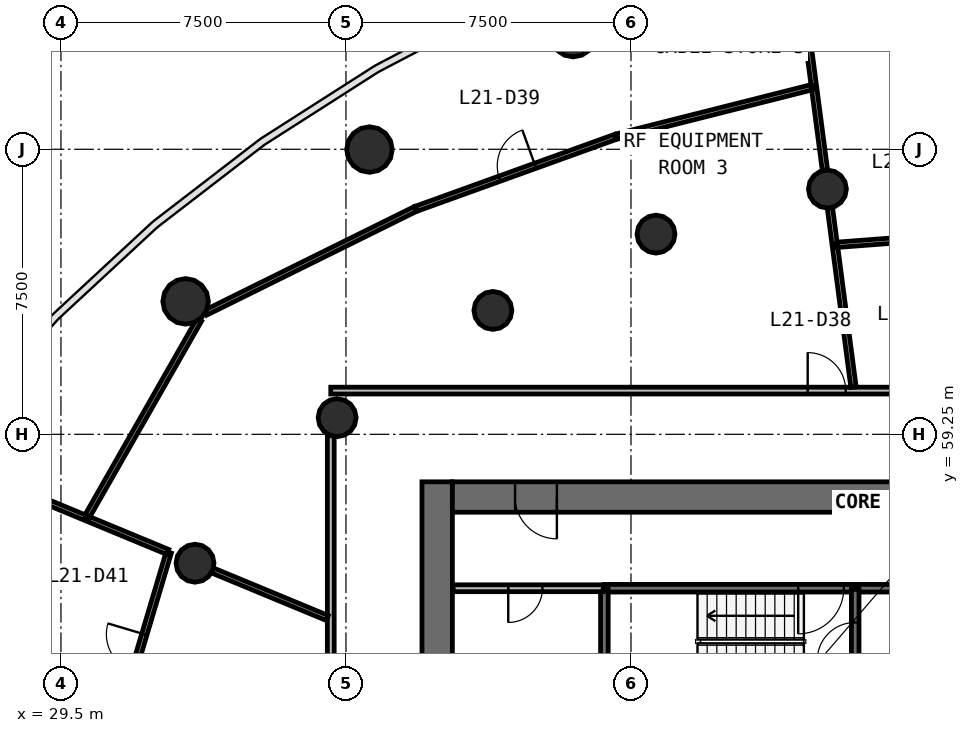
"""IFC4 building model, lengths in metres.
Left out: names, types, materials, properties, quantities, classifications, styles, units other than length and angle.
Written with IfcOpenShell. Run it as: python <this file> out.ifc"""

import sys

from ifc_helpers import new_model, si_unit, direction, frame, frame_2d, origin, origin_2d, place, context, subcontext, project, spatial, rectangle, circle, extrude, source, transform, mapped, element, fill, save


model = new_model("IFC4")
c1 = context("Model", 3, precision=1e-05, world=origin(), true_north=direction((0.0, 1.0)))
c2 = subcontext(c1, "Body", "Model", "MODEL_VIEW")
j1 = project(units=[si_unit("LENGTHUNIT", "METRE"), si_unit("PLANEANGLEUNIT", "RADIAN")], contexts=[c1])
p1 = place(None, origin())
s1 = spatial("IfcSite", under=j1, at=p1, CompositionType="ELEMENT")
p2 = place(p1, origin())
s2 = spatial("IfcBuilding", under=s1, at=p2, CompositionType="ELEMENT")
p3 = place(p2, frame((0.0, 0.0, 92.1)))
s3 = spatial("IfcBuildingStorey", under=s2, at=p3, CompositionType="ELEMENT", Elevation=92.1)
p4 = place(p3, frame((39.4, 58.0, 0.0), z_axis=(0.0, 0.0, 1.0), x_axis=(0.0, -1.0, 0.0)))
e1 = element("IfcWall", 1, at=p4, inside=s3, PredefinedType="SHEAR", context=c2, shape_type="SweptSolid", body=[
    extrude(rectangle(XDim=20.0, YDim=0.8, at=frame_2d((10.0, 0.0))), origin(), (0.0, 0.0, 1.0), 4.1),
])
p5 = place(p4, frame((9.1, 0.0, 0.0)))
e2 = element("IfcOpeningElement", 2, at=p5, cuts=e1, PredefinedType="OPENING", context=c2, shape_type="SweptSolid", body=[
    extrude(rectangle(XDim=1.8, YDim=2.1, at=frame_2d((0.9, 1.05))), frame((0.0, 0.41, 0.0), z_axis=(0.0, -1.0, 0.0), x_axis=(1.0, 0.0, 0.0)), (0.0, 0.0, 1.0), 0.82),
])
p6 = place(p3, frame((64.2, 57.6, 0.0), z_axis=(0.0, 0.0, 1.0), x_axis=(-1.0, 0.0, 0.0)))
e3 = element("IfcWall", 3, at=p6, inside=s3, PredefinedType="SHEAR", context=c2, shape_type="SweptSolid", body=[
    extrude(rectangle(XDim=24.4, YDim=0.8, at=frame_2d((12.2, 0.0))), origin(), (0.0, 0.0, 1.0), 4.1),
])
p7 = place(p6, frame((21.65, 0.0, 0.0)))
e4 = element("IfcOpeningElement", 4, at=p7, cuts=e3, PredefinedType="OPENING", context=c2, shape_type="SweptSolid", body=[
    extrude(rectangle(XDim=1.1, YDim=2.1, at=frame_2d((0.55, 1.05))), frame((0.0, 0.41, 0.0), z_axis=(0.0, -1.0, 0.0), x_axis=(1.0, 0.0, 0.0)), (0.0, 0.0, 1.0), 0.82),
])
p8 = place(p6, frame((2.15, 0.0, 0.0)))
e5 = element("IfcOpeningElement", 5, at=p8, cuts=e3, PredefinedType="OPENING", context=c2, shape_type="SweptSolid", body=[
    extrude(rectangle(XDim=1.1, YDim=2.1, at=frame_2d((0.55, 1.05))), frame((0.0, 0.41, 0.0), z_axis=(0.0, -1.0, 0.0), x_axis=(1.0, 0.0, 0.0)), (0.0, 0.0, 1.0), 0.82),
])
m1 = source(origin(), c2, "Body", "SweptSolid", [
    extrude(circle(Radius=0.6, at=origin_2d()), origin(), (0.0, 0.0, 1.0), 4.1),
])
for number, where, z_axis, x_axis in (
    (6, (42.978, 69.781, 0.0), (0.0, 0.0, 1.0), (1.0, 0.0, 0.0)),
    (7, (37.618, 66.743, 0.0), (0.0, 0.0, 1.0), (1.0, 0.0, 0.0)),
    (8, (32.78, 62.748, 0.0), (0.0, 0.0, 1.0), (1.0, 0.0, 0.0)),
):
    element("IfcColumn", number, at=place(p3, frame(where, z_axis=z_axis, x_axis=x_axis)), inside=s3, PredefinedType="COLUMN", context=c2, shape_type="MappedRepresentation", body=[
        mapped(m1, transform((0.0, 0.0, 0.0), scale=1.0)),
    ])
m2 = source(origin(), c2, "Body", "SweptSolid", [
    extrude(circle(Radius=0.5, at=origin_2d()), origin(), (0.0, 0.0, 1.0), 4.1),
])
for number, where, z_axis, x_axis in (
    (9, (49.669, 65.703, 0.0), (0.0, 0.0, 1.0), (1.0, 0.0, 0.0)),
    (10, (45.158, 64.518, 0.0), (0.0, 0.0, 1.0), (1.0, 0.0, 0.0)),
    (11, (40.866, 62.51, 0.0), (0.0, 0.0, 1.0), (1.0, 0.0, 0.0)),
    (12, (36.768, 59.688, 0.0), (0.0, 0.0, 1.0), (1.0, 0.0, 0.0)),
    (13, (33.028, 55.859, 0.0), (0.0, 0.0, 1.0), (1.0, 0.0, 0.0)),
):
    element("IfcColumn", number, at=place(p3, frame(where, z_axis=z_axis, x_axis=x_axis)), inside=s3, PredefinedType="COLUMN", context=c2, shape_type="MappedRepresentation", body=[
        mapped(m2, transform((0.0, 0.0, 0.0), scale=1.0)),
    ])
p9 = place(p3, frame((50.4, 55.2, 0.0), z_axis=(0.0, 0.0, 1.0), x_axis=(-1.0, 0.0, 0.0)))
e14 = element("IfcWall", 14, at=p9, inside=s3, PredefinedType="SOLIDWALL", context=c2, shape_type="SweptSolid", body=[
    extrude(rectangle(XDim=6.6, YDim=0.2, at=frame_2d((3.3, 0.0))), origin(), (0.0, 0.0, 1.0), 3.7),
])
p10 = place(p9, frame((0.3, 0.0, 0.0)))
e15 = element("IfcOpeningElement", 15, at=p10, cuts=e14, PredefinedType="OPENING", context=c2, shape_type="SweptSolid", body=[
    extrude(rectangle(XDim=1.2, YDim=2.1, at=frame_2d((0.6, 1.05))), frame((0.0, 0.11, 0.0), z_axis=(0.0, -1.0, 0.0), x_axis=(1.0, 0.0, 0.0)), (0.0, 0.0, 1.0), 0.22),
])
p11 = place(p3, frame((56.1, 55.2, 0.0), z_axis=(0.0, 0.0, 1.0), x_axis=(-1.0, 0.0, 0.0)))
e16 = element("IfcWall", 16, at=p11, inside=s3, PredefinedType="SOLIDWALL", context=c2, shape_type="SweptSolid", body=[
    extrude(rectangle(XDim=5.67, YDim=0.2, at=frame_2d((2.835, 0.0))), origin(), (0.0, 0.0, 1.0), 3.7),
])
p12 = place(p11, frame((2.95, 0.0, 0.0)))
e17 = element("IfcOpeningElement", 17, at=p12, cuts=e16, PredefinedType="OPENING", context=c2, shape_type="SweptSolid", body=[
    extrude(rectangle(XDim=1.1, YDim=2.1, at=frame_2d((0.55, 1.05))), frame((0.0, 0.11, 0.0), z_axis=(0.0, -1.0, 0.0), x_axis=(1.0, 0.0, 0.0)), (0.0, 0.0, 1.0), 0.22),
])
p13 = place(p3, frame((50.4, 52.4, 0.0), z_axis=(0.0, 0.0, 1.0), x_axis=(0.0, 1.0, 0.0)))
e18 = element("IfcWall", 18, at=p13, inside=s3, PredefinedType="SOLIDWALL", context=c2, shape_type="SweptSolid", body=[
    extrude(rectangle(XDim=2.77, YDim=0.2, at=frame_2d((1.385, 0.0))), origin(), (0.0, 0.0, 1.0), 3.7),
])
p14 = place(p13, frame((0.9, 0.0, 0.0)))
e19 = element("IfcOpeningElement", 19, at=p14, cuts=e18, PredefinedType="OPENING", context=c2, shape_type="SweptSolid", body=[
    extrude(rectangle(XDim=1.0, YDim=2.1, at=frame_2d((0.5, 1.05))), frame((0.0, 0.11, 0.0), z_axis=(0.0, -1.0, 0.0), x_axis=(1.0, 0.0, 0.0)), (0.0, 0.0, 1.0), 0.22),
])
p15 = place(p3, frame((43.8, 55.17, 0.0), z_axis=(0.0, 0.0, 1.0), x_axis=(0.0, -1.0, 0.0)))
e20 = element("IfcWall", 20, at=p15, inside=s3, PredefinedType="SOLIDWALL", context=c2, shape_type="SweptSolid", body=[
    extrude(rectangle(XDim=2.14, YDim=0.2, at=frame_2d((1.07, 0.0))), origin(), (0.0, 0.0, 1.0), 3.7),
])
p16 = place(p3, frame((36.6, 60.4, 0.0), z_axis=(0.0, 0.0, 1.0), x_axis=(1.0, 0.0, 0.0)))
e21 = element("IfcWall", 21, at=p16, inside=s3, PredefinedType="PARTITIONING", context=c2, shape_type="SweptSolid", body=[
    extrude(rectangle(XDim=30.8, YDim=0.18, at=frame_2d((15.4, 0.0))), origin(), (0.0, 0.0, 1.0), 2.9),
])
p17 = place(p16, frame((20.95, 0.0, 0.0)))
e22 = element("IfcOpeningElement", 22, at=p17, cuts=e21, PredefinedType="OPENING", context=c2, shape_type="SweptSolid", body=[
    extrude(rectangle(XDim=1.0, YDim=2.1, at=frame_2d((0.5, 1.05))), frame((0.0, 0.1, 0.0), z_axis=(0.0, -1.0, 0.0), x_axis=(1.0, 0.0, 0.0)), (0.0, 0.0, 1.0), 0.2),
])
p18 = place(p16, frame((14.95, 0.0, 0.0)))
e23 = element("IfcOpeningElement", 23, at=p18, cuts=e21, PredefinedType="OPENING", context=c2, shape_type="SweptSolid", body=[
    extrude(rectangle(XDim=1.0, YDim=2.1, at=frame_2d((0.5, 1.05))), frame((0.0, 0.1, 0.0), z_axis=(0.0, -1.0, 0.0), x_axis=(1.0, 0.0, 0.0)), (0.0, 0.0, 1.0), 0.2),
])
p19 = place(p16, frame((12.55, 0.0, 0.0)))
e24 = element("IfcOpeningElement", 24, at=p19, cuts=e21, PredefinedType="OPENING", context=c2, shape_type="SweptSolid", body=[
    extrude(rectangle(XDim=1.0, YDim=2.1, at=frame_2d((0.5, 1.05))), frame((0.0, 0.1, 0.0), z_axis=(0.0, -1.0, 0.0), x_axis=(1.0, 0.0, 0.0)), (0.0, 0.0, 1.0), 0.2),
])
p20 = place(p3, frame((36.6, 35.63, 0.0), z_axis=(0.0, 0.0, 1.0), x_axis=(0.0, 1.0, 0.0)))
e25 = element("IfcWall", 25, at=p20, inside=s3, PredefinedType="PARTITIONING", context=c2, shape_type="SweptSolid", body=[
    extrude(rectangle(XDim=23.583, YDim=0.18, at=frame_2d((11.791, 0.0))), origin(), (0.0, 0.0, 1.0), 2.9),
])
p21 = place(p20, frame((11.333, 0.0, 0.0)))
e26 = element("IfcOpeningElement", 26, at=p21, cuts=e25, PredefinedType="OPENING", context=c2, shape_type="SweptSolid", body=[
    extrude(rectangle(XDim=1.0, YDim=2.1, at=frame_2d((0.5, 1.05))), frame((0.0, 0.1, 0.0), z_axis=(0.0, -1.0, 0.0), x_axis=(1.0, 0.0, 0.0)), (0.0, 0.0, 1.0), 0.2),
])
p22 = place(p20, frame((4.532, 0.0, 0.0)))
e27 = element("IfcOpeningElement", 27, at=p22, cuts=e25, PredefinedType="OPENING", context=c2, shape_type="SweptSolid", body=[
    extrude(rectangle(XDim=1.0, YDim=2.1, at=frame_2d((0.5, 1.05))), frame((0.0, 0.1, 0.0), z_axis=(0.0, -1.0, 0.0), x_axis=(1.0, 0.0, 0.0)), (0.0, 0.0, 1.0), 0.2),
])
p23 = place(p3, frame((43.77, 55.2, 0.0), z_axis=(0.0, 0.0, 1.0), x_axis=(-1.0, 0.0, 0.0)))
e28 = element("IfcWall", 28, at=p23, inside=s3, PredefinedType="PARTITIONING", context=c2, shape_type="SweptSolid", body=[
    extrude(rectangle(XDim=3.95, YDim=0.18, at=frame_2d((1.975, 0.0))), origin(), (0.0, 0.0, 1.0), 3.7),
])
p24 = place(p23, frame((1.6, 0.0, 0.0)))
e29 = element("IfcOpeningElement", 29, at=p24, cuts=e28, PredefinedType="OPENING", context=c2, shape_type="SweptSolid", body=[
    extrude(rectangle(XDim=0.9, YDim=2.1, at=frame_2d((0.45, 1.05))), frame((0.0, 0.1, 0.0), z_axis=(0.0, -1.0, 0.0), x_axis=(1.0, 0.0, 0.0)), (0.0, 0.0, 1.0), 0.2),
])
p25 = place(p3, frame((38.821, 65.175, 0.0), z_axis=(0.0, 0.0, 1.0), x_axis=(-0.896426018312, -0.443193404388, 0.0)))
e30 = element("IfcWall", 30, at=p25, inside=s3, PredefinedType="PARTITIONING", context=c2, shape_type="SweptSolid", body=[
    extrude(rectangle(XDim=6.153, YDim=0.14, at=frame_2d((3.076, 0.0))), origin(), (0.0, 0.0, 1.0), 2.9),
])
p26 = place(p3, frame((33.14, 62.263, 0.0), z_axis=(0.0, 0.0, 1.0), x_axis=(-0.495587358923, -0.868558098043, 0.0)))
e31 = element("IfcWall", 31, at=p26, inside=s3, PredefinedType="PARTITIONING", context=c2, shape_type="SweptSolid", body=[
    extrude(rectangle(XDim=6.007, YDim=0.14, at=frame_2d((3.003, 0.0))), origin(), (0.0, 0.0, 1.0), 2.9),
])
p27 = place(p3, frame((38.849, 65.186, 0.0), z_axis=(0.0, 0.0, 1.0), x_axis=(0.940690895338, 0.339264851447, 0.0)))
e32 = element("IfcWall", 32, at=p27, inside=s3, PredefinedType="PARTITIONING", context=c2, shape_type="SweptSolid", body=[
    extrude(rectangle(XDim=5.579, YDim=0.14, at=frame_2d((2.79, 0.0))), origin(), (0.0, 0.0, 1.0), 2.9),
])
p28 = place(p27, frame((2.329, 0.0, 0.0)))
e33 = element("IfcOpeningElement", 33, at=p28, cuts=e32, PredefinedType="OPENING", context=c2, shape_type="SweptSolid", body=[
    extrude(rectangle(XDim=1.0, YDim=2.1, at=frame_2d((0.5, 1.05))), frame((0.0, 0.08, 0.0), z_axis=(0.0, -1.0, 0.0), x_axis=(1.0, 0.0, 0.0)), (0.0, 0.0, 1.0), 0.16),
])
p29 = place(p3, frame((30.753, 50.827, 0.0), z_axis=(0.0, 0.0, 1.0), x_axis=(0.28557117519, 0.95835750318, 0.0)))
e34 = element("IfcWall", 34, at=p29, inside=s3, PredefinedType="PARTITIONING", context=c2, shape_type="SweptSolid", body=[
    extrude(rectangle(XDim=5.548, YDim=0.14, at=frame_2d((2.774, 0.0))), origin(), (0.0, 0.0, 1.0), 2.9),
])
p30 = place(p29, frame((2.299, 0.0, 0.0)))
e35 = element("IfcOpeningElement", 35, at=p30, cuts=e34, PredefinedType="OPENING", context=c2, shape_type="SweptSolid", body=[
    extrude(rectangle(XDim=1.0, YDim=2.1, at=frame_2d((0.5, 1.05))), frame((0.0, 0.08, 0.0), z_axis=(0.0, -1.0, 0.0), x_axis=(1.0, 0.0, 0.0)), (0.0, 0.0, 1.0), 0.16),
])
p31 = place(p3, frame((49.315, 68.396, 0.0), z_axis=(0.0, 0.0, 1.0), x_axis=(-0.969532921221, -0.244961047249, 0.0)))
e36 = element("IfcWall", 36, at=p31, inside=s3, PredefinedType="PARTITIONING", context=c2, shape_type="SweptSolid", body=[
    extrude(rectangle(XDim=5.351, YDim=0.14, at=frame_2d((2.676, 0.0))), origin(), (0.0, 0.0, 1.0), 2.9),
])
p32 = place(p3, frame((49.863, 64.232, 0.0), z_axis=(0.0, 0.0, 1.0), x_axis=(0.997114299224, 0.075914914758, 0.0)))
e37 = element("IfcWall", 37, at=p32, inside=s3, PredefinedType="PARTITIONING", context=c2, shape_type="SweptSolid", body=[
    extrude(rectangle(XDim=4.3, YDim=0.14, at=frame_2d((2.15, 0.0))), origin(), (0.0, 0.0, 1.0), 2.9),
])
p33 = place(p32, frame((1.65, 0.0, 0.0)))
e38 = element("IfcOpeningElement", 38, at=p33, cuts=e37, PredefinedType="OPENING", context=c2, shape_type="SweptSolid", body=[
    extrude(rectangle(XDim=1.0, YDim=2.1, at=frame_2d((0.5, 1.05))), frame((0.0, 0.08, 0.0), z_axis=(0.0, -1.0, 0.0), x_axis=(1.0, 0.0, 0.0)), (0.0, 0.0, 1.0), 0.16),
])
p34 = place(p3, frame((50.356, 60.49, 0.0), z_axis=(0.0, 0.0, 1.0), x_axis=(-0.130497134821, 0.99144868642, 0.0)))
e39 = element("IfcWall", 39, at=p34, inside=s3, PredefinedType="PARTITIONING", context=c2, shape_type="SweptSolid", body=[
    extrude(rectangle(XDim=3.704, YDim=0.14, at=frame_2d((1.852, 0.0))), origin(), (0.0, 0.0, 1.0), 2.9),
])
p35 = place(p3, frame((36.51, 54.416, 0.0), z_axis=(0.0, 0.0, 1.0), x_axis=(-0.923911109142, 0.382607190737, 0.0)))
e40 = element("IfcWall", 40, at=p35, inside=s3, PredefinedType="PARTITIONING", context=c2, shape_type="SweptSolid", body=[
    extrude(rectangle(XDim=3.264, YDim=0.14, at=frame_2d((1.632, 0.0))), origin(), (0.0, 0.0, 1.0), 2.9),
])
p36 = place(p3, frame((49.311, 68.426, 0.0), z_axis=(0.0, 0.0, 1.0), x_axis=(-0.13054709887, 0.991442108737, 0.0)))
e41 = element("IfcWall", 41, at=p36, inside=s3, PredefinedType="PARTITIONING", context=c2, shape_type="SweptSolid", body=[
    extrude(rectangle(XDim=2.592, YDim=0.14, at=frame_2d((1.296, 0.0))), origin(), (0.0, 0.0, 1.0), 2.9),
])
p37 = place(p3, frame((32.31, 56.156, 0.0), z_axis=(0.0, 0.0, 1.0), x_axis=(-0.923901937079, 0.382629338474, 0.0)))
e42 = element("IfcWall", 42, at=p37, inside=s3, PredefinedType="PARTITIONING", context=c2, shape_type="SweptSolid", body=[
    extrude(rectangle(XDim=2.253, YDim=0.14, at=frame_2d((1.126, 0.0))), origin(), (0.0, 0.0, 1.0), 2.9),
])
p38 = place(p3, frame((49.604, 66.203, 0.0), z_axis=(0.0, 0.0, 1.0), x_axis=(-0.130513483775, 0.991446534389, 0.0)))
e43 = element("IfcWall", 43, at=p38, inside=s3, PredefinedType="PARTITIONING", context=c2, shape_type="SweptSolid", body=[
    extrude(rectangle(XDim=2.142, YDim=0.14, at=frame_2d((1.071, 0.0))), origin(), (0.0, 0.0, 1.0), 2.9),
])
p39 = place(p3, frame((30.135, 57.057, 0.0), z_axis=(0.0, 0.0, 1.0), x_axis=(-0.923911694708, 0.382605776723, 0.0)))
e44 = element("IfcWall", 44, at=p39, inside=s3, PredefinedType="PARTITIONING", context=c2, shape_type="SweptSolid", body=[
    extrude(rectangle(XDim=1.217, YDim=0.14, at=frame_2d((0.608, 0.0))), origin(), (0.0, 0.0, 1.0), 2.9),
])
p40 = place(p3, frame((49.859, 64.262, 0.0), z_axis=(0.0, 0.0, 1.0), x_axis=(-0.130614135366, 0.991433279471, 0.0)))
e45 = element("IfcWall", 45, at=p40, inside=s3, PredefinedType="PARTITIONING", context=c2, shape_type="SweptSolid", body=[
    extrude(rectangle(XDim=0.949, YDim=0.14, at=frame_2d((0.475, 0.0))), origin(), (0.0, 0.0, 1.0), 2.9),
])
m3 = source(origin(), c2, "Body", "SweptSolid", [
    extrude(rectangle(XDim=1.2, YDim=2.1, at=frame_2d((0.6, 1.05))), frame((0.0, 0.025, 0.0), z_axis=(0.0, -1.0, 0.0), x_axis=(1.0, 0.0, 0.0)), (0.0, 0.0, 1.0), 0.05),
])
p41 = place(p10, origin())
e46 = element("IfcDoor", 46, at=p41, inside=s3, OperationType="SINGLE_SWING_RIGHT", PredefinedType="DOOR", context=c2, shape_type="MappedRepresentation", body=[
    mapped(m3, transform((0.0, 0.0, 0.0), scale=1.0)),
])
fill(e15, e46)
m4 = source(origin(), c2, "Body", "SweptSolid", [
    extrude(rectangle(XDim=1.0, YDim=2.1, at=frame_2d((0.5, 1.05))), frame((0.0, 0.025, 0.0), z_axis=(0.0, -1.0, 0.0), x_axis=(1.0, 0.0, 0.0)), (0.0, 0.0, 1.0), 0.05),
])
p42 = place(p14, origin())
e47 = element("IfcDoor", 47, at=p42, inside=s3, OperationType="SINGLE_SWING_LEFT", PredefinedType="DOOR", context=c2, shape_type="MappedRepresentation", body=[
    mapped(m4, transform((0.0, 0.0, 0.0), scale=1.0)),
])
fill(e19, e47)
m5 = source(origin(), c2, "Body", "SweptSolid", [
    extrude(rectangle(XDim=1.1, YDim=2.1, at=frame_2d((0.55, 1.05))), frame((0.0, 0.025, 0.0), z_axis=(0.0, -1.0, 0.0), x_axis=(1.0, 0.0, 0.0)), (0.0, 0.0, 1.0), 0.05),
])
p43 = place(p7, origin())
e48 = element("IfcDoor", 48, at=p43, inside=s3, OperationType="SINGLE_SWING_LEFT", PredefinedType="DOOR", context=c2, shape_type="MappedRepresentation", body=[
    mapped(m5, transform((0.0, 0.0, 0.0), scale=1.0)),
])
fill(e4, e48)
m6 = source(origin(), c2, "Body", "SweptSolid", [
    extrude(rectangle(XDim=1.0, YDim=2.1, at=frame_2d((0.5, 1.05))), frame((0.0, 0.025, 0.0), z_axis=(0.0, -1.0, 0.0), x_axis=(1.0, 0.0, 0.0)), (0.0, 0.0, 1.0), 0.05),
])
p44 = place(p19, origin())
e49 = element("IfcDoor", 49, at=p44, inside=s3, OperationType="SINGLE_SWING_LEFT", PredefinedType="DOOR", context=c2, shape_type="MappedRepresentation", body=[
    mapped(m6, transform((0.0, 0.0, 0.0), scale=1.0)),
])
fill(e24, e49)
p45 = place(p28, origin())
e50 = element("IfcDoor", 50, at=p45, inside=s3, OperationType="SINGLE_SWING_RIGHT", PredefinedType="DOOR", context=c2, shape_type="MappedRepresentation", body=[
    mapped(m6, transform((0.0, 0.0, 0.0), scale=1.0)),
])
fill(e33, e50)
p46 = place(p30, origin())
e51 = element("IfcDoor", 51, at=p46, inside=s3, OperationType="SINGLE_SWING_RIGHT", PredefinedType="DOOR", context=c2, shape_type="MappedRepresentation", body=[
    mapped(m6, transform((0.0, 0.0, 0.0), scale=1.0)),
])
fill(e35, e51)
m7 = source(origin(), c2, "Body", "SweptSolid", [
    extrude(rectangle(XDim=0.9, YDim=2.1, at=frame_2d((0.45, 1.05))), frame((0.0, 0.025, 0.0), z_axis=(0.0, -1.0, 0.0), x_axis=(1.0, 0.0, 0.0)), (0.0, 0.0, 1.0), 0.05),
])
p47 = place(p24, origin())
e52 = element("IfcDoor", 52, at=p47, inside=s3, OperationType="SINGLE_SWING_RIGHT", PredefinedType="DOOR", context=c2, shape_type="MappedRepresentation", body=[
    mapped(m7, transform((0.0, 0.0, 0.0), scale=1.0)),
])
fill(e29, e52)
save(model, sys.argv[1])
